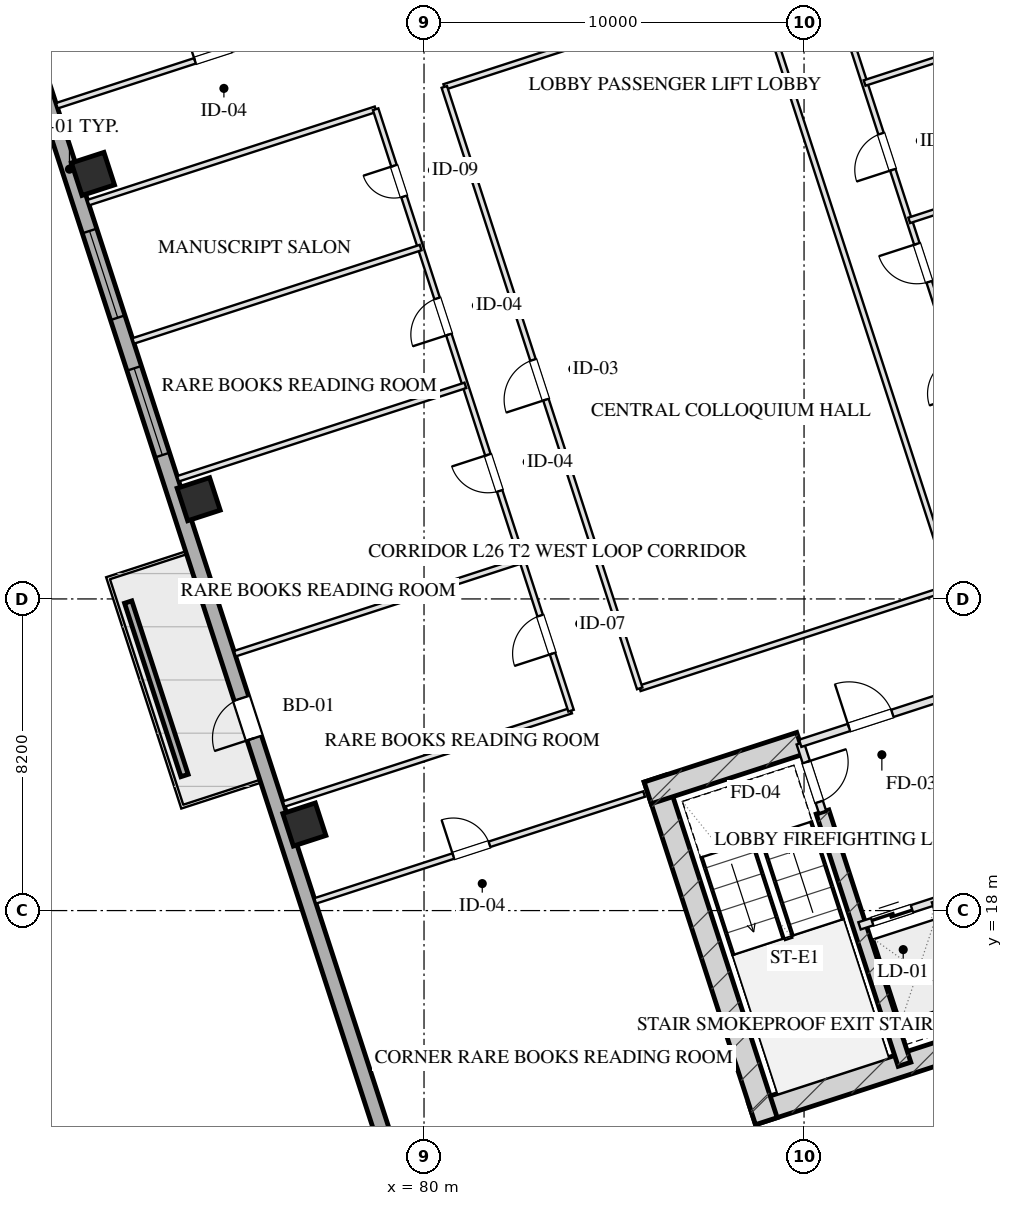
"""IFC4 building model, lengths in metres.
Left out: names, types, materials, properties, quantities, classifications, styles, units other than length and angle.
Written with IfcOpenShell. Run it as: python <this file> out.ifc"""

import sys

from ifc_helpers import new_model, si_unit, direction, frame, frame_2d, origin, origin_2d, place, context, subcontext, project, spatial, rectangle, hollow_rectangle, extrude, element, fill, save


model = new_model("IFC4")
c1 = context("Model", 3, precision=1e-05, world=origin(), true_north=direction((0.0, 1.0)))
c2 = subcontext(c1, "Body", "Model", "MODEL_VIEW")
j1 = project(units=[si_unit("LENGTHUNIT", "METRE"), si_unit("PLANEANGLEUNIT", "RADIAN")], contexts=[c1])
p1 = place(None, origin())
s1 = spatial("IfcSite", under=j1, at=p1, CompositionType="ELEMENT")
p2 = place(p1, origin())
s2 = spatial("IfcBuilding", under=s1, at=p2, CompositionType="ELEMENT")
p3 = place(p2, frame((0.0, 0.0, 103.5)))
s3 = spatial("IfcBuildingStorey", under=s2, at=p3, CompositionType="ELEMENT", Elevation=103.5)
p4 = place(p3, frame((88.63, 12.652, 0.0), z_axis=(0.0, 0.0, 1.0), x_axis=(0.95105714907, 0.309015046886, 0.0)))
e1 = element("IfcWall", 1, at=p4, inside=s3, PredefinedType="SHEAR", context=c2, shape_type="SweptSolid", body=[
    extrude(rectangle(XDim=16.4, YDim=0.6, at=frame_2d((8.2, 0.0))), origin(), (0.0, 0.0, 1.0), 3.45),
])
p5 = place(p3, frame((86.078, 21.475, 0.0), z_axis=(0.0, 0.0, 1.0), x_axis=(0.309017938678, -0.951056209472, 0.0)))
e2 = element("IfcWall", 2, at=p5, inside=s3, PredefinedType="SHEAR", context=c2, shape_type="SweptSolid", body=[
    extrude(rectangle(XDim=9.48, YDim=0.6, at=frame_2d((4.74, 0.0))), origin(), (0.0, 0.0, 1.0), 3.45),
])
p6 = place(p3, frame((90.486, 20.594, 0.0), z_axis=(0.0, 0.0, 1.0), x_axis=(0.309020428229, -0.951055400562, 0.0)))
e3 = element("IfcWall", 3, at=p6, inside=s3, PredefinedType="SHEAR", context=c2, shape_type="SweptSolid", body=[
    extrude(rectangle(XDim=6.98, YDim=0.35, at=frame_2d((3.49, 0.0))), origin(), (0.0, 0.0, 1.0), 3.45),
])
p7 = place(p3, frame((85.886, 21.097, 0.0), z_axis=(0.0, 0.0, 1.0), x_axis=(0.951068073652, 0.308981422225, 0.0)))
e4 = element("IfcWall", 4, at=p7, inside=s3, PredefinedType="SHEAR", context=c2, shape_type="SweptSolid", body=[
    extrude(rectangle(XDim=4.22, YDim=0.6, at=frame_2d((2.11, 0.0))), origin(), (0.0, 0.0, 1.0), 3.45),
])
for number, where, z_axis, x_axis in (
    (5, (76.851, 20.264, 0.0), (0.0, 0.0, 1.0), (0.951, 0.309, 0.0)),
    (6, (74.07, 28.824, 0.0), (0.0, 0.0, 1.0), (0.951, 0.309, 0.0)),
    (7, (71.289, 37.384, 0.0), (0.0, 0.0, 1.0), (0.951, 0.309, 0.0)),
):
    element("IfcColumn", number, at=place(p3, frame(where, z_axis=z_axis, x_axis=x_axis)), inside=s3, PredefinedType="COLUMN", context=c2, shape_type="SweptSolid", body=[
        extrude(hollow_rectangle(XDim=0.9, YDim=0.9, WallThickness=0.032, at=origin_2d()), origin(), (0.0, 0.0, 1.0), 3.451),
    ])
p8 = place(p3, frame((80.716, 6.59, 0.0), z_axis=(0.0, 0.0, 1.0), x_axis=(-0.309017542002, 0.95105633836, 0.0)))
e8 = element("IfcWall", 8, at=p8, inside=s3, PredefinedType="SOLIDWALL", context=c2, shape_type="SweptSolid", body=[
    extrude(rectangle(XDim=46.4, YDim=0.4, at=frame_2d((23.2, 0.0))), origin(), (0.0, 0.0, 1.0), 2.61),
])
p9 = place(p8, frame((24.6, 0.0, 0.75)))
e9 = element("IfcOpeningElement", 9, at=p9, cuts=e8, PredefinedType="OPENING", context=c2, shape_type="SweptSolid", body=[
    extrude(rectangle(XDim=2.4, YDim=1.46, at=frame_2d((1.2, 0.73))), frame((0.0, 0.21, 0.0), z_axis=(0.0, -1.0, 0.0), x_axis=(1.0, 0.0, 0.0)), (0.0, 0.0, 1.0), 0.42),
])
p10 = place(p8, frame((28.4, 0.0, 0.75)))
e10 = element("IfcOpeningElement", 10, at=p10, cuts=e8, PredefinedType="OPENING", context=c2, shape_type="SweptSolid", body=[
    extrude(rectangle(XDim=2.4, YDim=1.46, at=frame_2d((1.2, 0.73))), frame((0.0, 0.21, 0.0), z_axis=(0.0, -1.0, 0.0), x_axis=(1.0, 0.0, 0.0)), (0.0, 0.0, 1.0), 0.42),
])
p11 = place(p8, frame((16.77, 0.0, 0.0)))
e11 = element("IfcOpeningElement", 11, at=p11, cuts=e8, PredefinedType="OPENING", context=c2, shape_type="SweptSolid", body=[
    extrude(rectangle(XDim=1.1, YDim=2.15, at=frame_2d((0.55, 1.075))), frame((0.0, 0.21, 0.0), z_axis=(0.0, -1.0, 0.0), x_axis=(1.0, 0.0, 0.0)), (0.0, 0.0, 1.0), 0.42),
])
p12 = place(p3, frame((111.953, 14.005, 0.0), z_axis=(0.0, 0.0, 1.0), x_axis=(-0.95105505922, -0.309021478754, 0.0)))
e12 = element("IfcWall", 12, at=p12, inside=s3, PredefinedType="SOLIDWALL", context=c2, shape_type="SweptSolid", body=[
    extrude(rectangle(XDim=29.4, YDim=0.4, at=frame_2d((14.7, 0.0))), origin(), (0.0, 0.0, 1.0), 2.61),
])
p13 = place(p3, frame((73.698, 21.553, 0.0), z_axis=(0.0, 0.0, 1.0), x_axis=(-0.309032019345, 0.951051634255, 0.0)))
e13 = element("IfcWall", 13, at=p13, inside=s3, PredefinedType="PARAPET", context=c2, shape_type="SweptSolid", body=[
    extrude(rectangle(XDim=4.8, YDim=0.2, at=frame_2d((2.4, 0.0))), origin(), (0.0, 0.0, 1.0), 0.75),
])
p14 = place(p3, frame((89.899, 22.401, 0.0), z_axis=(0.0, 0.0, 1.0), x_axis=(0.308932062672, -0.951084108086, 0.0)))
e14 = element("IfcWall", 14, at=p14, inside=s3, PredefinedType="PARTITIONING", context=c2, shape_type="SweptSolid", body=[
    extrude(rectangle(XDim=1.9, YDim=0.2, at=frame_2d((0.95, 0.0))), origin(), (0.0, 0.0, 1.0), 3.175),
])
p15 = place(p14, frame((0.52, 0.0, 0.0)))
e15 = element("IfcOpeningElement", 15, at=p15, cuts=e14, PredefinedType="OPENING", context=c2, shape_type="SweptSolid", body=[
    extrude(rectangle(XDim=1.1, YDim=2.05, at=frame_2d((0.55, 1.025))), frame((0.0, 0.11, 0.0), z_axis=(0.0, -1.0, 0.0), x_axis=(1.0, 0.0, 0.0)), (0.0, 0.0, 1.0), 0.22),
])
p16 = place(p3, frame((89.899, 22.401, 0.0), z_axis=(0.0, 0.0, 1.0), x_axis=(0.951046716504, 0.309047153403, 0.0)))
e16 = element("IfcWall", 16, at=p16, inside=s3, PredefinedType="PARTITIONING", context=c2, shape_type="SweptSolid", body=[
    extrude(rectangle(XDim=3.83, YDim=0.2, at=frame_2d((1.915, 0.0))), origin(), (0.0, 0.0, 1.0), 3.175),
])
p17 = place(p16, frame((1.35, 0.0, 0.0)))
e17 = element("IfcOpeningElement", 17, at=p17, cuts=e16, PredefinedType="OPENING", context=c2, shape_type="SweptSolid", body=[
    extrude(rectangle(XDim=1.2, YDim=2.05, at=frame_2d((0.6, 1.025))), frame((0.0, 0.11, 0.0), z_axis=(0.0, -1.0, 0.0), x_axis=(1.0, 0.0, 0.0)), (0.0, 0.0, 1.0), 0.22),
])
p18 = place(p3, frame((91.46, 17.598, 0.0), z_axis=(0.0, 0.0, 1.0), x_axis=(0.951062257173, 0.308999325213, 0.0)))
e18 = element("IfcWall", 18, at=p18, inside=s3, PredefinedType="PARTITIONING", context=c2, shape_type="SweptSolid", body=[
    extrude(rectangle(XDim=2.1, YDim=0.2, at=frame_2d((1.05, 0.0))), origin(), (0.0, 0.0, 1.0), 3.175),
])
p19 = place(p18, frame((0.35, 0.0, 0.0)))
e19 = element("IfcOpeningElement", 19, at=p19, cuts=e18, PredefinedType="OPENING", context=c2, shape_type="SweptSolid", body=[
    extrude(rectangle(XDim=1.1, YDim=2.05, at=frame_2d((0.55, 1.025))), frame((0.0, 0.11, 0.0), z_axis=(0.0, -1.0, 0.0), x_axis=(1.0, 0.0, 0.0)), (0.0, 0.0, 1.0), 0.22),
])
p20 = place(p3, frame((93.457, 18.247, 0.0), z_axis=(0.0, 0.0, 1.0), x_axis=(0.3089935693, -0.951064127245, 0.0)))
e20 = element("IfcWall", 20, at=p20, inside=s3, PredefinedType="PARTITIONING", context=c2, shape_type="SweptSolid", body=[
    extrude(rectangle(XDim=3.7, YDim=0.2, at=frame_2d((1.85, 0.0))), origin(), (0.0, 0.0, 1.0), 3.175),
])
p21 = place(p3, frame((77.136, 18.254, 0.0), z_axis=(0.0, 0.0, 1.0), x_axis=(0.951057133767, 0.309015093986, 0.0)))
e21 = element("IfcWall", 21, at=p21, inside=s3, PredefinedType="PARTITIONING", context=c2, shape_type="SweptSolid", body=[
    extrude(rectangle(XDim=9.1, YDim=0.15, at=frame_2d((4.55, 0.0))), origin(), (0.0, 0.0, 1.0), 3.175),
])
p22 = place(p21, frame((3.822, 0.0, 0.0)))
e22 = element("IfcOpeningElement", 22, at=p22, cuts=e21, PredefinedType="OPENING", context=c2, shape_type="SweptSolid", body=[
    extrude(rectangle(XDim=1.0, YDim=2.05, at=frame_2d((0.5, 1.025))), frame((0.0, 0.085, 0.0), z_axis=(0.0, -1.0, 0.0), x_axis=(1.0, 0.0, 0.0)), (0.0, 0.0, 1.0), 0.17),
])
p23 = place(p3, frame((70.338, 39.177, 0.0), z_axis=(0.0, 0.0, 1.0), x_axis=(0.951059695568, 0.309007209409, 0.0)))
e23 = element("IfcWall", 23, at=p23, inside=s3, PredefinedType="PARTITIONING", context=c2, shape_type="SweptSolid", body=[
    extrude(rectangle(XDim=9.1, YDim=0.15, at=frame_2d((4.55, 0.0))), origin(), (0.0, 0.0, 1.0), 3.175),
])
p24 = place(p23, frame((3.822, 0.0, 0.0)))
e24 = element("IfcOpeningElement", 24, at=p24, cuts=e23, PredefinedType="OPENING", context=c2, shape_type="SweptSolid", body=[
    extrude(rectangle(XDim=1.0, YDim=2.05, at=frame_2d((0.5, 1.025))), frame((0.0, 0.085, 0.0), z_axis=(0.0, -1.0, 0.0), x_axis=(1.0, 0.0, 0.0)), (0.0, 0.0, 1.0), 0.17),
])
p25 = place(p3, frame((76.308, 20.803, 0.0), z_axis=(0.0, 0.0, 1.0), x_axis=(0.95105437725, 0.3090235776, 0.0)))
e25 = element("IfcWall", 25, at=p25, inside=s3, PredefinedType="PARTITIONING", context=c2, shape_type="SweptSolid", body=[
    extrude(rectangle(XDim=7.95, YDim=0.15, at=frame_2d((3.975, 0.0))), origin(), (0.0, 0.0, 1.0), 3.175),
])
p26 = place(p3, frame((85.676, 23.847, 0.0), z_axis=(0.0, 0.0, 1.0), x_axis=(0.951063309554, 0.308996086091, 0.0)))
e26 = element("IfcWall", 26, at=p26, inside=s3, PredefinedType="PARTITIONING", context=c2, shape_type="SweptSolid", body=[
    extrude(rectangle(XDim=8.65, YDim=0.15, at=frame_2d((4.325, 0.0))), origin(), (0.0, 0.0, 1.0), 3.175),
])
p27 = place(p3, frame((71.166, 36.629, 0.0), z_axis=(0.0, 0.0, 1.0), x_axis=(0.951060470027, 0.309004825775, 0.0)))
e27 = element("IfcWall", 27, at=p27, inside=s3, PredefinedType="PARTITIONING", context=c2, shape_type="SweptSolid", body=[
    extrude(rectangle(XDim=7.95, YDim=0.15, at=frame_2d((3.975, 0.0))), origin(), (0.0, 0.0, 1.0), 3.175),
])
p28 = place(p3, frame((80.534, 39.672, 0.0), z_axis=(0.0, 0.0, 1.0), x_axis=(0.951052319652, 0.309029910015, 0.0)))
e28 = element("IfcWall", 28, at=p28, inside=s3, PredefinedType="PARTITIONING", context=c2, shape_type="SweptSolid", body=[
    extrude(rectangle(XDim=8.65, YDim=0.15, at=frame_2d((4.325, 0.0))), origin(), (0.0, 0.0, 1.0), 3.175),
])
p29 = place(p3, frame((83.869, 23.26, 0.0), z_axis=(0.0, 0.0, 1.0), x_axis=(-0.309022042254, 0.951054876125, 0.0)))
e29 = element("IfcWall", 29, at=p29, inside=s3, PredefinedType="PARTITIONING", context=c2, shape_type="SweptSolid", body=[
    extrude(rectangle(XDim=16.64, YDim=0.15, at=frame_2d((8.32, 0.0))), origin(), (0.0, 0.0, 1.0), 3.175),
])
p30 = place(p29, frame((1.58, 0.0, 0.0)))
e30 = element("IfcOpeningElement", 30, at=p30, cuts=e29, PredefinedType="OPENING", context=c2, shape_type="SweptSolid", body=[
    extrude(rectangle(XDim=1.05, YDim=2.05, at=frame_2d((0.525, 1.025))), frame((0.0, 0.085, 0.0), z_axis=(0.0, -1.0, 0.0), x_axis=(1.0, 0.0, 0.0)), (0.0, 0.0, 1.0), 0.17),
])
p31 = place(p29, frame((6.08, 0.0, 0.0)))
e31 = element("IfcOpeningElement", 31, at=p31, cuts=e29, PredefinedType="OPENING", context=c2, shape_type="SweptSolid", body=[
    extrude(rectangle(XDim=1.0, YDim=2.05, at=frame_2d((0.5, 1.025))), frame((0.0, 0.085, 0.0), z_axis=(0.0, -1.0, 0.0), x_axis=(1.0, 0.0, 0.0)), (0.0, 0.0, 1.0), 0.17),
])
p32 = place(p29, frame((10.406, 0.0, 0.0)))
e32 = element("IfcOpeningElement", 32, at=p32, cuts=e29, PredefinedType="OPENING", context=c2, shape_type="SweptSolid", body=[
    extrude(rectangle(XDim=1.0, YDim=2.05, at=frame_2d((0.5, 1.025))), frame((0.0, 0.085, 0.0), z_axis=(0.0, -1.0, 0.0), x_axis=(1.0, 0.0, 0.0)), (0.0, 0.0, 1.0), 0.17),
])
p33 = place(p29, frame((14.226, 0.0, 0.0)))
e33 = element("IfcOpeningElement", 33, at=p33, cuts=e29, PredefinedType="OPENING", context=c2, shape_type="SweptSolid", body=[
    extrude(rectangle(XDim=0.85, YDim=2.05, at=frame_2d((0.425, 1.025))), frame((0.0, 0.085, 0.0), z_axis=(0.0, -1.0, 0.0), x_axis=(1.0, 0.0, 0.0)), (0.0, 0.0, 1.0), 0.17),
])
p34 = place(p3, frame((85.676, 23.847, 0.0), z_axis=(0.0, 0.0, 1.0), x_axis=(-0.309008771245, 0.951059188113, 0.0)))
e34 = element("IfcWall", 34, at=p34, inside=s3, PredefinedType="PARTITIONING", context=c2, shape_type="SweptSolid", body=[
    extrude(rectangle(XDim=16.64, YDim=0.15, at=frame_2d((8.32, 0.0))), origin(), (0.0, 0.0, 1.0), 3.175),
])
p35 = place(p34, frame((7.987, 0.0, 0.0)))
e35 = element("IfcOpeningElement", 35, at=p35, cuts=e34, PredefinedType="OPENING", context=c2, shape_type="SweptSolid", body=[
    extrude(rectangle(XDim=1.1, YDim=2.05, at=frame_2d((0.55, 1.025))), frame((0.0, 0.085, 0.0), z_axis=(0.0, -1.0, 0.0), x_axis=(1.0, 0.0, 0.0)), (0.0, 0.0, 1.0), 0.17),
])
p36 = place(p3, frame((93.903, 26.52, 0.0), z_axis=(0.0, 0.0, 1.0), x_axis=(-0.30901773025, 0.951056277195, 0.0)))
e36 = element("IfcWall", 36, at=p36, inside=s3, PredefinedType="PARTITIONING", context=c2, shape_type="SweptSolid", body=[
    extrude(rectangle(XDim=16.64, YDim=0.15, at=frame_2d((8.32, 0.0))), origin(), (0.0, 0.0, 1.0), 3.175),
])
p37 = place(p3, frame((95.709, 27.107, 0.0), z_axis=(0.0, 0.0, 1.0), x_axis=(-0.30901773025, 0.951056277195, 0.0)))
e37 = element("IfcWall", 37, at=p37, inside=s3, PredefinedType="PARTITIONING", context=c2, shape_type="SweptSolid", body=[
    extrude(rectangle(XDim=16.64, YDim=0.15, at=frame_2d((8.32, 0.0))), origin(), (0.0, 0.0, 1.0), 3.175),
])
p38 = place(p37, frame((1.164, 0.0, 0.0)))
e38 = element("IfcOpeningElement", 38, at=p38, cuts=e37, PredefinedType="OPENING", context=c2, shape_type="SweptSolid", body=[
    extrude(rectangle(XDim=1.0, YDim=2.05, at=frame_2d((0.5, 1.025))), frame((0.0, 0.085, 0.0), z_axis=(0.0, -1.0, 0.0), x_axis=(1.0, 0.0, 0.0)), (0.0, 0.0, 1.0), 0.17),
])
p39 = place(p37, frame((4.724, 0.0, 0.0)))
e39 = element("IfcOpeningElement", 39, at=p39, cuts=e37, PredefinedType="OPENING", context=c2, shape_type="SweptSolid", body=[
    extrude(rectangle(XDim=1.0, YDim=2.05, at=frame_2d((0.5, 1.025))), frame((0.0, 0.085, 0.0), z_axis=(0.0, -1.0, 0.0), x_axis=(1.0, 0.0, 0.0)), (0.0, 0.0, 1.0), 0.17),
])
p40 = place(p37, frame((7.82, 0.0, 0.0)))
e40 = element("IfcOpeningElement", 40, at=p40, cuts=e37, PredefinedType="OPENING", context=c2, shape_type="SweptSolid", body=[
    extrude(rectangle(XDim=1.05, YDim=2.05, at=frame_2d((0.525, 1.025))), frame((0.0, 0.085, 0.0), z_axis=(0.0, -1.0, 0.0), x_axis=(1.0, 0.0, 0.0)), (0.0, 0.0, 1.0), 0.17),
])
p41 = place(p37, frame((10.92, 0.0, 0.0)))
e41 = element("IfcOpeningElement", 41, at=p41, cuts=e37, PredefinedType="OPENING", context=c2, shape_type="SweptSolid", body=[
    extrude(rectangle(XDim=1.0, YDim=2.05, at=frame_2d((0.5, 1.025))), frame((0.0, 0.085, 0.0), z_axis=(0.0, -1.0, 0.0), x_axis=(1.0, 0.0, 0.0)), (0.0, 0.0, 1.0), 0.17),
])
p42 = place(p37, frame((14.48, 0.0, 0.0)))
e42 = element("IfcOpeningElement", 42, at=p42, cuts=e37, PredefinedType="OPENING", context=c2, shape_type="SweptSolid", body=[
    extrude(rectangle(XDim=1.0, YDim=2.05, at=frame_2d((0.5, 1.025))), frame((0.0, 0.085, 0.0), z_axis=(0.0, -1.0, 0.0), x_axis=(1.0, 0.0, 0.0)), (0.0, 0.0, 1.0), 0.17),
])
for number, where, z_axis, x_axis in (
    (43, (75.022, 24.76, 0.0), (0.0, 0.0, 1.0), (0.951, 0.309, 0.0)),
    (44, (73.527, 29.363, 0.0), (0.0, 0.0, 1.0), (0.951, 0.309, 0.0)),
    (45, (72.349, 32.989, 0.0), (0.0, 0.0, 1.0), (0.951, 0.309, 0.0)),
):
    element("IfcWall", number, at=place(p3, frame(where, z_axis=z_axis, x_axis=x_axis)), inside=s3, PredefinedType="PARTITIONING", context=c2, shape_type="SweptSolid", body=[
        extrude(rectangle(XDim=7.95, YDim=0.15, at=frame_2d((3.975, 0.0))), origin(), (0.0, 0.0, 1.0), 3.175),
    ])
p43 = place(p3, frame((92.768, 36.161, 0.0), z_axis=(0.0, 0.0, 1.0), x_axis=(0.951058377365, 0.309011266531, 0.0)))
e46 = element("IfcWall", 46, at=p43, inside=s3, PredefinedType="PARTITIONING", context=c2, shape_type="SweptSolid", body=[
    extrude(rectangle(XDim=13.8, YDim=0.15, at=frame_2d((6.9, 0.0))), origin(), (0.0, 0.0, 1.0), 3.175),
])
p44 = place(p3, frame((91.594, 39.775, 0.0), z_axis=(0.0, 0.0, 1.0), x_axis=(0.951056688031, 0.309016465825, 0.0)))
e47 = element("IfcWall", 47, at=p44, inside=s3, PredefinedType="PARTITIONING", context=c2, shape_type="SweptSolid", body=[
    extrude(rectangle(XDim=13.8, YDim=0.15, at=frame_2d((6.9, 0.0))), origin(), (0.0, 0.0, 1.0), 3.175),
])
p45 = place(p9, origin())
e48 = element("IfcWindow", 48, at=p45, inside=s3, PartitioningType="TRIPLE_PANEL_VERTICAL", PredefinedType="WINDOW", context=c2, shape_type="SweptSolid", body=[
    extrude(rectangle(XDim=2.4, YDim=1.46, at=frame_2d((1.2, 0.73))), frame((0.0, 0.03, 0.0), z_axis=(0.0, -1.0, 0.0), x_axis=(1.0, 0.0, 0.0)), (0.0, 0.0, 1.0), 0.06),
])
fill(e9, e48)
p46 = place(p10, origin())
e49 = element("IfcWindow", 49, at=p46, inside=s3, PartitioningType="TRIPLE_PANEL_VERTICAL", PredefinedType="WINDOW", context=c2, shape_type="SweptSolid", body=[
    extrude(rectangle(XDim=2.4, YDim=1.46, at=frame_2d((1.2, 0.73))), frame((0.0, 0.03, 0.0), z_axis=(0.0, -1.0, 0.0), x_axis=(1.0, 0.0, 0.0)), (0.0, 0.0, 1.0), 0.06),
])
fill(e10, e49)
p47 = place(p11, origin())
e50 = element("IfcDoor", 50, at=p47, inside=s3, OperationType="SINGLE_SWING_LEFT", PredefinedType="DOOR", context=c2, shape_type="SweptSolid", body=[
    extrude(rectangle(XDim=1.1, YDim=2.15, at=frame_2d((0.55, 1.075))), frame((0.0, 0.025, 0.0), z_axis=(0.0, -1.0, 0.0), x_axis=(1.0, 0.0, 0.0)), (0.0, 0.0, 1.0), 0.05),
])
fill(e11, e50)
p48 = place(p15, origin())
e51 = element("IfcDoor", 51, at=p48, inside=s3, OperationType="SINGLE_SWING_LEFT", PredefinedType="DOOR", context=c2, shape_type="SweptSolid", body=[
    extrude(rectangle(XDim=1.1, YDim=2.05, at=frame_2d((0.55, 1.025))), frame((0.0, 0.025, 0.0), z_axis=(0.0, -1.0, 0.0), x_axis=(1.0, 0.0, 0.0)), (0.0, 0.0, 1.0), 0.05),
])
fill(e15, e51)
p49 = place(p17, origin())
e52 = element("IfcDoor", 52, at=p49, inside=s3, OperationType="SINGLE_SWING_LEFT", PredefinedType="DOOR", context=c2, shape_type="SweptSolid", body=[
    extrude(rectangle(XDim=1.2, YDim=2.05, at=frame_2d((0.6, 1.025))), frame((0.0, 0.025, 0.0), z_axis=(0.0, -1.0, 0.0), x_axis=(1.0, 0.0, 0.0)), (0.0, 0.0, 1.0), 0.05),
])
fill(e17, e52)
p50 = place(p19, origin())
e53 = element("IfcDoor", 53, at=p50, inside=s3, OperationType="DOUBLE_DOOR_SLIDING", PredefinedType="DOOR", context=c2, shape_type="SweptSolid", body=[
    extrude(rectangle(XDim=1.1, YDim=2.05, at=frame_2d((0.55, 1.025))), frame((0.0, 0.025, 0.0), z_axis=(0.0, -1.0, 0.0), x_axis=(1.0, 0.0, 0.0)), (0.0, 0.0, 1.0), 0.05),
])
fill(e19, e53)
p51 = place(p22, origin())
e54 = element("IfcDoor", 54, at=p51, inside=s3, OperationType="SINGLE_SWING_LEFT", PredefinedType="DOOR", context=c2, shape_type="SweptSolid", body=[
    extrude(rectangle(XDim=1.0, YDim=2.05, at=frame_2d((0.5, 1.025))), frame((0.0, 0.025, 0.0), z_axis=(0.0, -1.0, 0.0), x_axis=(1.0, 0.0, 0.0)), (0.0, 0.0, 1.0), 0.05),
])
fill(e22, e54)
p52 = place(p24, origin())
e55 = element("IfcDoor", 55, at=p52, inside=s3, OperationType="SINGLE_SWING_LEFT", PredefinedType="DOOR", context=c2, shape_type="SweptSolid", body=[
    extrude(rectangle(XDim=1.0, YDim=2.05, at=frame_2d((0.5, 1.025))), frame((0.0, 0.025, 0.0), z_axis=(0.0, -1.0, 0.0), x_axis=(1.0, 0.0, 0.0)), (0.0, 0.0, 1.0), 0.05),
])
fill(e24, e55)
p53 = place(p30, origin())
e56 = element("IfcDoor", 56, at=p53, inside=s3, OperationType="SINGLE_SWING_LEFT", PredefinedType="DOOR", context=c2, shape_type="SweptSolid", body=[
    extrude(rectangle(XDim=1.05, YDim=2.05, at=frame_2d((0.525, 1.025))), frame((0.0, 0.025, 0.0), z_axis=(0.0, -1.0, 0.0), x_axis=(1.0, 0.0, 0.0)), (0.0, 0.0, 1.0), 0.05),
])
fill(e30, e56)
p54 = place(p31, origin())
e57 = element("IfcDoor", 57, at=p54, inside=s3, OperationType="SINGLE_SWING_RIGHT", PredefinedType="DOOR", context=c2, shape_type="SweptSolid", body=[
    extrude(rectangle(XDim=1.0, YDim=2.05, at=frame_2d((0.5, 1.025))), frame((0.0, 0.025, 0.0), z_axis=(0.0, -1.0, 0.0), x_axis=(1.0, 0.0, 0.0)), (0.0, 0.0, 1.0), 0.05),
])
fill(e31, e57)
p55 = place(p32, origin())
e58 = element("IfcDoor", 58, at=p55, inside=s3, OperationType="SINGLE_SWING_LEFT", PredefinedType="DOOR", context=c2, shape_type="SweptSolid", body=[
    extrude(rectangle(XDim=1.0, YDim=2.05, at=frame_2d((0.5, 1.025))), frame((0.0, 0.025, 0.0), z_axis=(0.0, -1.0, 0.0), x_axis=(1.0, 0.0, 0.0)), (0.0, 0.0, 1.0), 0.05),
])
fill(e32, e58)
p56 = place(p33, origin())
e59 = element("IfcDoor", 59, at=p56, inside=s3, OperationType="SINGLE_SWING_RIGHT", PredefinedType="DOOR", context=c2, shape_type="SweptSolid", body=[
    extrude(rectangle(XDim=0.85, YDim=2.05, at=frame_2d((0.425, 1.025))), frame((0.0, 0.025, 0.0), z_axis=(0.0, -1.0, 0.0), x_axis=(1.0, 0.0, 0.0)), (0.0, 0.0, 1.0), 0.05),
])
fill(e33, e59)
p57 = place(p35, origin())
e60 = element("IfcDoor", 60, at=p57, inside=s3, OperationType="SINGLE_SWING_LEFT", PredefinedType="DOOR", context=c2, shape_type="SweptSolid", body=[
    extrude(rectangle(XDim=1.1, YDim=2.05, at=frame_2d((0.55, 1.025))), frame((0.0, 0.025, 0.0), z_axis=(0.0, -1.0, 0.0), x_axis=(1.0, 0.0, 0.0)), (0.0, 0.0, 1.0), 0.05),
])
fill(e35, e60)
p58 = place(p40, origin())
e61 = element("IfcDoor", 61, at=p58, inside=s3, OperationType="SINGLE_SWING_RIGHT", PredefinedType="DOOR", context=c2, shape_type="SweptSolid", body=[
    extrude(rectangle(XDim=1.05, YDim=2.05, at=frame_2d((0.525, 1.025))), frame((0.0, 0.025, 0.0), z_axis=(0.0, -1.0, 0.0), x_axis=(1.0, 0.0, 0.0)), (0.0, 0.0, 1.0), 0.05),
])
fill(e40, e61)
p59 = place(p41, origin())
e62 = element("IfcDoor", 62, at=p59, inside=s3, OperationType="SINGLE_SWING_LEFT", PredefinedType="DOOR", context=c2, shape_type="SweptSolid", body=[
    extrude(rectangle(XDim=1.0, YDim=2.05, at=frame_2d((0.5, 1.025))), frame((0.0, 0.025, 0.0), z_axis=(0.0, -1.0, 0.0), x_axis=(1.0, 0.0, 0.0)), (0.0, 0.0, 1.0), 0.05),
])
fill(e41, e62)
save(model, sys.argv[1])
